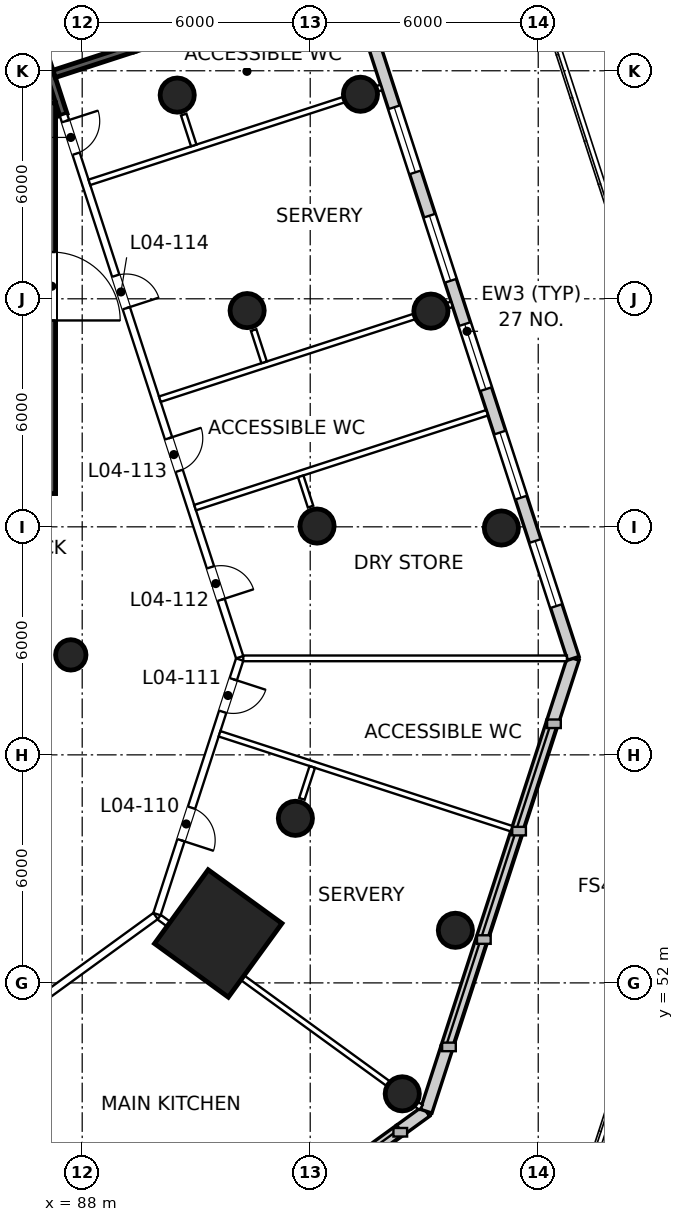
"""IFC4 building model, lengths in metres.
Left out: names, types, materials, properties, quantities, classifications, styles, units other than length and angle.
Written with IfcOpenShell. Run it as: python <this file> out.ifc"""

import sys

from ifc_helpers import new_model, si_unit, direction, frame, frame_2d, origin, origin_2d, place, context, subcontext, project, spatial, rectangle, circle, extrude, element, fill, save


model = new_model("IFC4")
c1 = context("Model", 3, precision=1e-05, world=origin(), true_north=direction((0.0, 1.0)))
c2 = subcontext(c1, "Body", "Model", "MODEL_VIEW")
j1 = project(units=[si_unit("LENGTHUNIT", "METRE"), si_unit("PLANEANGLEUNIT", "RADIAN")], contexts=[c1])
p1 = place(None, origin())
s1 = spatial("IfcSite", under=j1, at=p1, CompositionType="ELEMENT")
p2 = place(p1, origin())
s2 = spatial("IfcBuilding", under=s1, at=p2, CompositionType="ELEMENT")
p3 = place(p2, frame((0.0, 0.0, 29.0)))
s3 = spatial("IfcBuildingStorey", under=s2, at=p3, CompositionType="ELEMENT", Elevation=29.0)
p4 = place(p3, frame((91.58, 53.3, 0.0), z_axis=(0.0, 0.0, 1.0), x_axis=(0.809016994375, -0.587785252292, 0.0)))
e1 = element("IfcColumn", 1, at=p4, inside=s3, PredefinedType="COLUMN", context=c2, shape_type="SweptSolid", body=[
    extrude(rectangle(XDim=2.4, YDim=2.4, at=origin_2d()), origin(), (0.0, 0.0, 1.0), 5.0),
])
for number, where, z_axis, x_axis in (
    (2, (93.61, 56.33, 0.0), (0.0, 0.0, 1.0), (1.0, 0.0, 0.0)),
    (3, (94.18, 64.02, 0.0), (0.0, 0.0, 1.0), (1.0, 0.0, 0.0)),
    (4, (92.34, 69.69, 0.0), (0.0, 0.0, 1.0), (1.0, 0.0, 0.0)),
    (5, (90.5, 75.36, 0.0), (0.0, 0.0, 1.0), (1.0, 0.0, 0.0)),
):
    element("IfcColumn", number, at=place(p3, frame(where, z_axis=z_axis, x_axis=x_axis)), inside=s3, PredefinedType="COLUMN", context=c2, shape_type="SweptSolid", body=[
        extrude(circle(Radius=0.45, at=origin_2d()), origin(), (0.0, 0.0, 1.0), 5.0),
    ])
p5 = place(p3, frame((87.7, 60.63, 0.0), z_axis=(0.0, 0.0, 1.0), x_axis=(1.0, 0.0, 0.0)))
e6 = element("IfcColumn", 6, at=p5, inside=s3, PredefinedType="COLUMN", context=c2, shape_type="SweptSolid", body=[
    extrude(circle(Radius=0.4, at=origin_2d()), origin(), (0.0, 0.0, 1.0), 5.0),
])
for number, where, z_axis, x_axis in (
    (7, (96.422, 49.081, 0.0), (0.0, 0.0, 1.0), (1.0, 0.0, 0.0)),
    (8, (97.82, 53.384, 0.0), (0.0, 0.0, 1.0), (1.0, 0.0, 0.0)),
    (9, (99.03, 63.969, 0.0), (0.0, 0.0, 1.0), (1.0, 0.0, 0.0)),
    (10, (97.176, 69.676, 0.0), (0.0, 0.0, 1.0), (1.0, 0.0, 0.0)),
    (11, (95.322, 75.382, 0.0), (0.0, 0.0, 1.0), (1.0, 0.0, 0.0)),
):
    element("IfcColumn", number, at=place(p3, frame(where, z_axis=z_axis, x_axis=x_axis)), inside=s3, PredefinedType="COLUMN", context=c2, shape_type="SweptSolid", body=[
        extrude(circle(Radius=0.45, at=origin_2d()), origin(), (0.0, 0.0, 1.0), 5.0),
    ])
p6 = place(p3, frame((89.085, 42.836, 0.0), z_axis=(0.0, 0.0, 1.0), x_axis=(0.808999938455, 0.587808727036, 0.0)))
e12 = element("IfcWall", 12, at=p6, inside=s3, PredefinedType="SOLIDWALL", context=c2, shape_type="SweptSolid", body=[
    extrude(rectangle(XDim=9.0, YDim=0.32, at=frame_2d((4.5, 0.0))), origin(), (0.0, 0.0, 1.0), 0.9),
])
p7 = place(p3, frame((96.366, 48.126, 0.0), z_axis=(0.0, 0.0, 1.0), x_axis=(0.809172006105, 0.587571837766, 0.0)))
e13 = element("IfcWall", 13, at=p7, inside=s3, PredefinedType="SOLIDWALL", context=c2, shape_type="SweptSolid", body=[
    extrude(rectangle(XDim=0.847, YDim=0.32, at=frame_2d((0.424, 0.0))), origin(), (0.0, 0.0, 1.0), 4.65),
])
p8 = place(p3, frame((97.052, 48.624, 0.0), z_axis=(0.0, 0.0, 1.0), x_axis=(0.308995332064, 0.951063554534, 0.0)))
e14 = element("IfcWall", 14, at=p8, inside=s3, PredefinedType="SOLIDWALL", context=c2, shape_type="SweptSolid", body=[
    extrude(rectangle(XDim=1.764, YDim=0.32, at=frame_2d((0.882, 0.0))), origin(), (0.0, 0.0, 1.0), 4.65),
])
p9 = place(p3, frame((97.597, 50.302, 0.0), z_axis=(0.0, 0.0, 1.0), x_axis=(0.309000197986, 0.951061973609, 0.0)))
e15 = element("IfcWall", 15, at=p9, inside=s3, PredefinedType="SOLIDWALL", context=c2, shape_type="SweptSolid", body=[
    extrude(rectangle(XDim=9.0, YDim=0.32, at=frame_2d((4.5, 0.0))), origin(), (0.0, 0.0, 1.0), 0.9),
])
p10 = place(p3, frame((100.378, 58.861, 0.0), z_axis=(0.0, 0.0, 1.0), x_axis=(0.309036002497, 0.951050339972, 0.0)))
e16 = element("IfcWall", 16, at=p10, inside=s3, PredefinedType="SOLIDWALL", context=c2, shape_type="SweptSolid", body=[
    extrude(rectangle(XDim=1.764, YDim=0.32, at=frame_2d((0.882, 0.0))), origin(), (0.0, 0.0, 1.0), 4.65),
])
p11 = place(p3, frame((100.923, 60.539, 0.0), z_axis=(0.0, 0.0, 1.0), x_axis=(-0.309011034794, 0.95105845266, 0.0)))
e17 = element("IfcWall", 17, at=p11, inside=s3, PredefinedType="SOLIDWALL", context=c2, shape_type="SweptSolid", body=[
    extrude(rectangle(XDim=18.098, YDim=0.32, at=frame_2d((9.049, 0.0))), origin(), (0.0, 0.0, 1.0), 4.65),
])
p12 = place(p11, frame((1.447, 0.0, 0.9)))
e18 = element("IfcOpeningElement", 18, at=p12, cuts=e17, PredefinedType="OPENING", context=c2, shape_type="SweptSolid", body=[
    extrude(rectangle(XDim=1.8, YDim=2.1, at=frame_2d((0.9, 1.05))), frame((0.0, 0.17, 0.0), z_axis=(0.0, -1.0, 0.0), x_axis=(1.0, 0.0, 0.0)), (0.0, 0.0, 1.0), 0.34),
])
p13 = place(p11, frame((4.447, 0.0, 0.9)))
e19 = element("IfcOpeningElement", 19, at=p13, cuts=e17, PredefinedType="OPENING", context=c2, shape_type="SweptSolid", body=[
    extrude(rectangle(XDim=1.8, YDim=2.1, at=frame_2d((0.9, 1.05))), frame((0.0, 0.17, 0.0), z_axis=(0.0, -1.0, 0.0), x_axis=(1.0, 0.0, 0.0)), (0.0, 0.0, 1.0), 0.34),
])
p14 = place(p11, frame((7.447, 0.0, 0.9)))
e20 = element("IfcOpeningElement", 20, at=p14, cuts=e17, PredefinedType="OPENING", context=c2, shape_type="SweptSolid", body=[
    extrude(rectangle(XDim=1.8, YDim=2.1, at=frame_2d((0.9, 1.05))), frame((0.0, 0.17, 0.0), z_axis=(0.0, -1.0, 0.0), x_axis=(1.0, 0.0, 0.0)), (0.0, 0.0, 1.0), 0.34),
])
p15 = place(p11, frame((10.447, 0.0, 0.9)))
e21 = element("IfcOpeningElement", 21, at=p15, cuts=e17, PredefinedType="OPENING", context=c2, shape_type="SweptSolid", body=[
    extrude(rectangle(XDim=1.8, YDim=2.1, at=frame_2d((0.9, 1.05))), frame((0.0, 0.17, 0.0), z_axis=(0.0, -1.0, 0.0), x_axis=(1.0, 0.0, 0.0)), (0.0, 0.0, 1.0), 0.34),
])
p16 = place(p11, frame((13.447, 0.0, 0.9)))
e22 = element("IfcOpeningElement", 22, at=p16, cuts=e17, PredefinedType="OPENING", context=c2, shape_type="SweptSolid", body=[
    extrude(rectangle(XDim=1.8, YDim=2.1, at=frame_2d((0.9, 1.05))), frame((0.0, 0.17, 0.0), z_axis=(0.0, -1.0, 0.0), x_axis=(1.0, 0.0, 0.0)), (0.0, 0.0, 1.0), 0.34),
])
p17 = place(p3, frame((87.009, 76.374, 0.0), z_axis=(0.0, 0.0, 1.0), x_axis=(0.308958737343, -0.95107544318, 0.0)))
e23 = element("IfcWall", 23, at=p17, inside=s3, PredefinedType="PARTITIONING", context=c2, shape_type="SweptSolid", body=[
    extrude(rectangle(XDim=1.604, YDim=0.2, at=frame_2d((0.802, 0.0))), origin(), (0.0, 0.0, 1.0), 4.65),
])
p18 = place(p3, frame((87.504, 74.848, 0.0), z_axis=(0.0, 0.0, 1.0), x_axis=(0.309027605618, -0.951053068428, 0.0)))
e24 = element("IfcWall", 24, at=p18, inside=s3, PredefinedType="PARTITIONING", context=c2, shape_type="SweptSolid", body=[
    extrude(rectangle(XDim=15.013, YDim=0.2, at=frame_2d((7.506, 0.0))), origin(), (0.0, 0.0, 1.0), 4.65),
])
p19 = place(p18, frame((12.527, 0.0, 0.0)))
e25 = element("IfcOpeningElement", 25, at=p19, cuts=e24, PredefinedType="OPENING", context=c2, shape_type="SweptSolid", body=[
    extrude(rectangle(XDim=0.9, YDim=2.1, at=frame_2d((0.45, 1.05))), frame((0.0, 0.11, 0.0), z_axis=(0.0, -1.0, 0.0), x_axis=(1.0, 0.0, 0.0)), (0.0, 0.0, 1.0), 0.22),
])
p20 = place(p18, frame((8.958, 0.0, 0.0)))
e26 = element("IfcOpeningElement", 26, at=p20, cuts=e24, PredefinedType="OPENING", context=c2, shape_type="SweptSolid", body=[
    extrude(rectangle(XDim=0.9, YDim=2.1, at=frame_2d((0.45, 1.05))), frame((0.0, 0.11, 0.0), z_axis=(0.0, -1.0, 0.0), x_axis=(1.0, 0.0, 0.0)), (0.0, 0.0, 1.0), 0.22),
])
p21 = place(p18, frame((4.458, 0.0, 0.0)))
e27 = element("IfcOpeningElement", 27, at=p21, cuts=e24, PredefinedType="OPENING", context=c2, shape_type="SweptSolid", body=[
    extrude(rectangle(XDim=0.9, YDim=2.1, at=frame_2d((0.45, 1.05))), frame((0.0, 0.11, 0.0), z_axis=(0.0, -1.0, 0.0), x_axis=(1.0, 0.0, 0.0)), (0.0, 0.0, 1.0), 0.22),
])
p22 = place(p18, frame((0.183, 0.0, 0.0)))
e28 = element("IfcOpeningElement", 28, at=p22, cuts=e24, PredefinedType="OPENING", context=c2, shape_type="SweptSolid", body=[
    extrude(rectangle(XDim=0.9, YDim=2.1, at=frame_2d((0.45, 1.05))), frame((0.0, 0.11, 0.0), z_axis=(0.0, -1.0, 0.0), x_axis=(1.0, 0.0, 0.0)), (0.0, 0.0, 1.0), 0.22),
])
p23 = place(p3, frame((92.144, 60.508, 0.0), z_axis=(0.0, 0.0, 1.0), x_axis=(-0.309023375149, -0.951054443032, 0.0)))
e29 = element("IfcWall", 29, at=p23, inside=s3, PredefinedType="PARTITIONING", context=c2, shape_type="SweptSolid", body=[
    extrude(rectangle(XDim=7.044, YDim=0.2, at=frame_2d((3.522, 0.0))), origin(), (0.0, 0.0, 1.0), 4.65),
])
p24 = place(p23, frame((4.099, 0.0, 0.0)))
e30 = element("IfcOpeningElement", 30, at=p24, cuts=e29, PredefinedType="OPENING", context=c2, shape_type="SweptSolid", body=[
    extrude(rectangle(XDim=0.9, YDim=2.1, at=frame_2d((0.45, 1.05))), frame((0.0, 0.11, 0.0), z_axis=(0.0, -1.0, 0.0), x_axis=(1.0, 0.0, 0.0)), (0.0, 0.0, 1.0), 0.22),
])
p25 = place(p23, frame((0.545, 0.0, 0.0)))
e31 = element("IfcOpeningElement", 31, at=p25, cuts=e29, PredefinedType="OPENING", context=c2, shape_type="SweptSolid", body=[
    extrude(rectangle(XDim=0.9, YDim=2.1, at=frame_2d((0.45, 1.05))), frame((0.0, 0.11, 0.0), z_axis=(0.0, -1.0, 0.0), x_axis=(1.0, 0.0, 0.0)), (0.0, 0.0, 1.0), 0.22),
])
p26 = place(p3, frame((89.931, 53.759, 0.0), z_axis=(0.0, 0.0, 1.0), x_axis=(-0.809024401628, -0.587775056948, 0.0)))
e32 = element("IfcWall", 32, at=p26, inside=s3, PredefinedType="PARTITIONING", context=c2, shape_type="SweptSolid", body=[
    extrude(rectangle(XDim=13.763, YDim=0.2, at=frame_2d((6.882, 0.0))), origin(), (0.0, 0.0, 1.0), 4.65),
])
p27 = place(p26, frame((4.586, 0.0, 0.0)))
e33 = element("IfcOpeningElement", 33, at=p27, cuts=e32, PredefinedType="OPENING", context=c2, shape_type="SweptSolid", body=[
    extrude(rectangle(XDim=0.9, YDim=2.1, at=frame_2d((0.45, 1.05))), frame((0.0, 0.11, 0.0), z_axis=(0.0, -1.0, 0.0), x_axis=(1.0, 0.0, 0.0)), (0.0, 0.0, 1.0), 0.22),
])
p28 = place(p3, frame((96.915, 48.723, 0.0), z_axis=(0.0, 0.0, 1.0), x_axis=(-0.809007500309, 0.587798319531, 0.0)))
e34 = element("IfcWall", 34, at=p28, inside=s3, PredefinedType="PARTITIONING", context=c2, shape_type="SweptSolid", body=[
    extrude(rectangle(XDim=8.516, YDim=0.15, at=frame_2d((4.258, 0.0))), origin(), (0.0, 0.0, 1.0), 4.65),
])
p29 = place(p3, frame((100.755, 60.539, 0.0), z_axis=(0.0, 0.0, 1.0), x_axis=(-1.0, 0.0, 0.0)))
e35 = element("IfcWall", 35, at=p29, inside=s3, PredefinedType="PARTITIONING", context=c2, shape_type="SweptSolid", body=[
    extrude(rectangle(XDim=8.516, YDim=0.15, at=frame_2d((4.258, 0.0))), origin(), (0.0, 0.0, 1.0), 3.75),
])
p30 = place(p3, frame((99.299, 56.058, 0.0), z_axis=(0.0, 0.0, 1.0), x_axis=(-0.951058046839, 0.309012283804, 0.0)))
e36 = element("IfcWall", 36, at=p30, inside=s3, PredefinedType="PARTITIONING", context=c2, shape_type="SweptSolid", body=[
    extrude(rectangle(XDim=8.08, YDim=0.15, at=frame_2d((4.04, 0.0))), origin(), (0.0, 0.0, 1.0), 3.75),
])
for number, where, z_axis, x_axis in (
    (37, (98.655, 67.002, 0.0), (0.0, 0.0, 1.0), (-0.951, -0.309, 0.0)),
    (38, (97.728, 69.855, 0.0), (0.0, 0.0, 1.0), (-0.951, -0.309, 0.0)),
    (39, (95.874, 75.561, 0.0), (0.0, 0.0, 1.0), (-0.951, -0.309, 0.0)),
):
    element("IfcWall", number, at=place(p3, frame(where, z_axis=z_axis, x_axis=x_axis)), inside=s3, PredefinedType="PARTITIONING", context=c2, shape_type="SweptSolid", body=[
        extrude(rectangle(XDim=8.08, YDim=0.15, at=frame_2d((4.04, 0.0))), origin(), (0.0, 0.0, 1.0), 3.95),
    ])
p31 = place(p3, frame((89.349, 76.596, 0.0), z_axis=(0.0, 0.0, 1.0), x_axis=(-0.951037339136, -0.309076009373, 0.0)))
e40 = element("IfcWall", 40, at=p31, inside=s3, PredefinedType="PARTITIONING", context=c2, shape_type="SweptSolid", body=[
    extrude(rectangle(XDim=2.194, YDim=0.2, at=frame_2d((1.097, 0.0))), origin(), (0.0, 0.0, 1.0), 4.65),
])
p32 = place(p3, frame((87.2, 75.155, 0.0), z_axis=(0.0, 0.0, 1.0), x_axis=(0.0, -1.0, 0.0)))
e41 = element("IfcWall", 41, at=p32, inside=s3, PredefinedType="PARTITIONING", context=c2, shape_type="SweptSolid", body=[
    extrude(rectangle(XDim=10.28, YDim=0.2, at=frame_2d((5.14, 0.0))), origin(), (0.0, 0.0, 1.0), 4.65),
])
p33 = place(p32, frame((3.925, 0.0, 0.0)))
e42 = element("IfcOpeningElement", 42, at=p33, cuts=e41, PredefinedType="OPENING", context=c2, shape_type="SweptSolid", body=[
    extrude(rectangle(XDim=1.8, YDim=2.1, at=frame_2d((0.9, 1.05))), frame((0.0, 0.11, 0.0), z_axis=(0.0, -1.0, 0.0), x_axis=(1.0, 0.0, 0.0)), (0.0, 0.0, 1.0), 0.22),
])
p34 = place(p3, frame((93.781, 56.842, 0.0), z_axis=(0.0, 0.0, 1.0), x_axis=(0.309092318163, 0.951032038815, 0.0)))
e43 = element("IfcWall", 43, at=p34, inside=s3, PredefinedType="PARTITIONING", context=c2, shape_type="SweptSolid", body=[
    extrude(rectangle(XDim=0.884, YDim=0.15, at=frame_2d((0.442, 0.0))), origin(), (0.0, 0.0, 1.0), 3.95),
])
p35 = place(p3, frame((94.009, 64.532, 0.0), z_axis=(0.0, 0.0, 1.0), x_axis=(-0.308789641401, 0.951130357713, 0.0)))
e44 = element("IfcWall", 44, at=p35, inside=s3, PredefinedType="PARTITIONING", context=c2, shape_type="SweptSolid", body=[
    extrude(rectangle(XDim=0.838, YDim=0.15, at=frame_2d((0.419, 0.0))), origin(), (0.0, 0.0, 1.0), 3.95),
])
p36 = place(p3, frame((92.511, 69.178, 0.0), z_axis=(0.0, 0.0, 1.0), x_axis=(0.309166424814, -0.951007950423, 0.0)))
e45 = element("IfcWall", 45, at=p36, inside=s3, PredefinedType="PARTITIONING", context=c2, shape_type="SweptSolid", body=[
    extrude(rectangle(XDim=0.893, YDim=0.15, at=frame_2d((0.447, 0.0))), origin(), (0.0, 0.0, 1.0), 3.95),
])
p37 = place(p3, frame((90.671, 74.848, 0.0), z_axis=(0.0, 0.0, 1.0), x_axis=(0.30893097988, -0.951084459798, 0.0)))
e46 = element("IfcWall", 46, at=p37, inside=s3, PredefinedType="PARTITIONING", context=c2, shape_type="SweptSolid", body=[
    extrude(rectangle(XDim=0.854, YDim=0.15, at=frame_2d((0.427, 0.0))), origin(), (0.0, 0.0, 1.0), 3.95),
])
p38 = place(p12, origin())
e47 = element("IfcWindow", 47, at=p38, inside=s3, PartitioningType="SINGLE_PANEL", PredefinedType="WINDOW", context=c2, shape_type="SweptSolid", body=[
    extrude(rectangle(XDim=1.8, YDim=2.1, at=frame_2d((0.9, 1.05))), frame((0.0, 0.07, 0.0), z_axis=(0.0, -1.0, 0.0), x_axis=(1.0, 0.0, 0.0)), (0.0, 0.0, 1.0), 0.06),
])
fill(e18, e47)
p39 = place(p13, origin())
e48 = element("IfcWindow", 48, at=p39, inside=s3, PartitioningType="SINGLE_PANEL", PredefinedType="WINDOW", context=c2, shape_type="SweptSolid", body=[
    extrude(rectangle(XDim=1.8, YDim=2.1, at=frame_2d((0.9, 1.05))), frame((0.0, 0.07, 0.0), z_axis=(0.0, -1.0, 0.0), x_axis=(1.0, 0.0, 0.0)), (0.0, 0.0, 1.0), 0.06),
])
fill(e19, e48)
p40 = place(p14, origin())
e49 = element("IfcWindow", 49, at=p40, inside=s3, PartitioningType="SINGLE_PANEL", PredefinedType="WINDOW", context=c2, shape_type="SweptSolid", body=[
    extrude(rectangle(XDim=1.8, YDim=2.1, at=frame_2d((0.9, 1.05))), frame((0.0, 0.07, 0.0), z_axis=(0.0, -1.0, 0.0), x_axis=(1.0, 0.0, 0.0)), (0.0, 0.0, 1.0), 0.06),
])
fill(e20, e49)
p41 = place(p15, origin())
e50 = element("IfcWindow", 50, at=p41, inside=s3, PartitioningType="SINGLE_PANEL", PredefinedType="WINDOW", context=c2, shape_type="SweptSolid", body=[
    extrude(rectangle(XDim=1.8, YDim=2.1, at=frame_2d((0.9, 1.05))), frame((0.0, 0.07, 0.0), z_axis=(0.0, -1.0, 0.0), x_axis=(1.0, 0.0, 0.0)), (0.0, 0.0, 1.0), 0.06),
])
fill(e21, e50)
p42 = place(p16, origin())
e51 = element("IfcWindow", 51, at=p42, inside=s3, PartitioningType="SINGLE_PANEL", PredefinedType="WINDOW", context=c2, shape_type="SweptSolid", body=[
    extrude(rectangle(XDim=1.8, YDim=2.1, at=frame_2d((0.9, 1.05))), frame((0.0, 0.07, 0.0), z_axis=(0.0, -1.0, 0.0), x_axis=(1.0, 0.0, 0.0)), (0.0, 0.0, 1.0), 0.06),
])
fill(e22, e51)
p43 = place(p24, origin())
e52 = element("IfcDoor", 52, at=p43, inside=s3, OperationType="SINGLE_SWING_RIGHT", PredefinedType="DOOR", context=c2, shape_type="SweptSolid", body=[
    extrude(rectangle(XDim=0.9, YDim=2.1, at=frame_2d((0.45, 1.05))), frame((0.0, 0.025, 0.0), z_axis=(0.0, -1.0, 0.0), x_axis=(1.0, 0.0, 0.0)), (0.0, 0.0, 1.0), 0.05),
])
fill(e30, e52)
p44 = place(p25, origin())
e53 = element("IfcDoor", 53, at=p44, inside=s3, OperationType="SINGLE_SWING_LEFT", PredefinedType="DOOR", context=c2, shape_type="SweptSolid", body=[
    extrude(rectangle(XDim=0.9, YDim=2.1, at=frame_2d((0.45, 1.05))), frame((0.0, 0.025, 0.0), z_axis=(0.0, -1.0, 0.0), x_axis=(1.0, 0.0, 0.0)), (0.0, 0.0, 1.0), 0.05),
])
fill(e31, e53)
p45 = place(p19, origin())
e54 = element("IfcDoor", 54, at=p45, inside=s3, OperationType="SINGLE_SWING_RIGHT", PredefinedType="DOOR", context=c2, shape_type="SweptSolid", body=[
    extrude(rectangle(XDim=0.9, YDim=2.1, at=frame_2d((0.45, 1.05))), frame((0.0, 0.025, 0.0), z_axis=(0.0, -1.0, 0.0), x_axis=(1.0, 0.0, 0.0)), (0.0, 0.0, 1.0), 0.05),
])
fill(e25, e54)
p46 = place(p20, origin())
e55 = element("IfcDoor", 55, at=p46, inside=s3, OperationType="SINGLE_SWING_LEFT", PredefinedType="DOOR", context=c2, shape_type="SweptSolid", body=[
    extrude(rectangle(XDim=0.9, YDim=2.1, at=frame_2d((0.45, 1.05))), frame((0.0, 0.025, 0.0), z_axis=(0.0, -1.0, 0.0), x_axis=(1.0, 0.0, 0.0)), (0.0, 0.0, 1.0), 0.05),
])
fill(e26, e55)
p47 = place(p21, origin())
e56 = element("IfcDoor", 56, at=p47, inside=s3, OperationType="SINGLE_SWING_RIGHT", PredefinedType="DOOR", context=c2, shape_type="SweptSolid", body=[
    extrude(rectangle(XDim=0.9, YDim=2.1, at=frame_2d((0.45, 1.05))), frame((0.0, 0.025, 0.0), z_axis=(0.0, -1.0, 0.0), x_axis=(1.0, 0.0, 0.0)), (0.0, 0.0, 1.0), 0.05),
])
fill(e27, e56)
p48 = place(p22, origin())
e57 = element("IfcDoor", 57, at=p48, inside=s3, OperationType="SINGLE_SWING_LEFT", PredefinedType="DOOR", context=c2, shape_type="SweptSolid", body=[
    extrude(rectangle(XDim=0.9, YDim=2.1, at=frame_2d((0.45, 1.05))), frame((0.0, 0.025, 0.0), z_axis=(0.0, -1.0, 0.0), x_axis=(1.0, 0.0, 0.0)), (0.0, 0.0, 1.0), 0.05),
])
fill(e28, e57)
p49 = place(p33, origin())
e58 = element("IfcDoor", 58, at=p49, inside=s3, OperationType="DOUBLE_DOOR_SINGLE_SWING", PredefinedType="DOOR", context=c2, shape_type="SweptSolid", body=[
    extrude(rectangle(XDim=1.8, YDim=2.1, at=frame_2d((0.9, 1.05))), frame((0.0, 0.025, 0.0), z_axis=(0.0, -1.0, 0.0), x_axis=(1.0, 0.0, 0.0)), (0.0, 0.0, 1.0), 0.05),
])
fill(e42, e58)
save(model, sys.argv[1])
